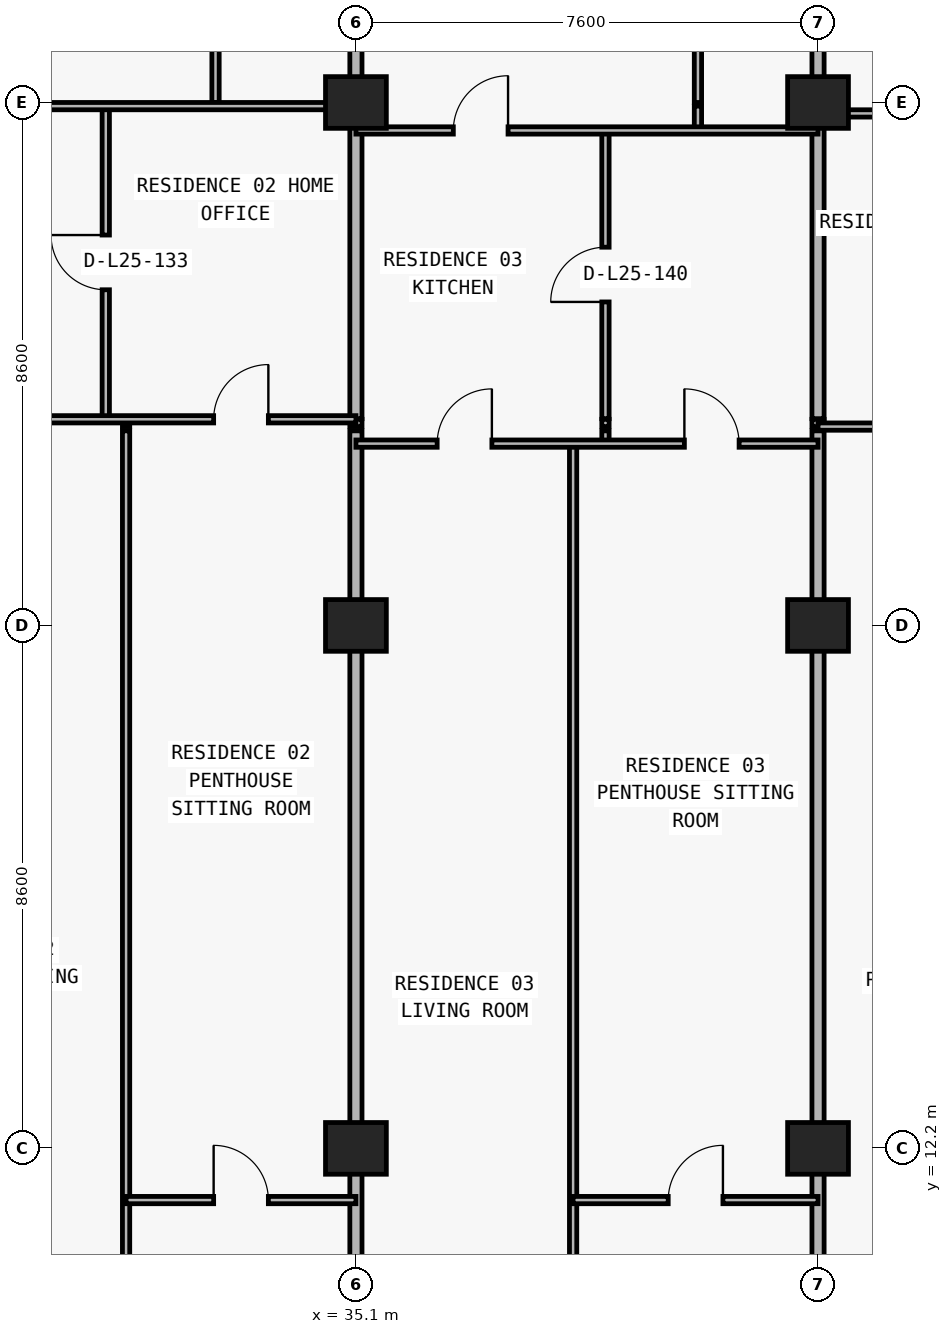
"""IFC4 building model, lengths in metres.
Left out: names, types, materials, properties, quantities, classifications, styles, units other than length and angle.
Written with IfcOpenShell. Run it as: python <this file> out.ifc"""

import sys

from ifc_helpers import new_model, si_unit, direction, frame, frame_2d, origin, origin_2d, place, context, subcontext, project, spatial, rectangle, extrude, element, fill, save


model = new_model("IFC4")
c1 = context("Model", 3, precision=1e-05, world=origin(), true_north=direction((0.0, 1.0)))
c2 = subcontext(c1, "Body", "Model", "MODEL_VIEW")
j1 = project(units=[si_unit("LENGTHUNIT", "METRE"), si_unit("PLANEANGLEUNIT", "RADIAN")], contexts=[c1])
p1 = place(None, origin())
s1 = spatial("IfcSite", under=j1, at=p1, CompositionType="ELEMENT")
p2 = place(p1, origin())
s2 = spatial("IfcBuilding", under=s1, at=p2, CompositionType="ELEMENT")
p3 = place(p2, frame((0.0, 0.0, 94.5)))
s3 = spatial("IfcBuildingStorey", under=s2, at=p3, CompositionType="ELEMENT", Elevation=94.5)
for number, where, z_axis, x_axis in (
    (1, (35.1, 12.2, 0.0), (0.0, 0.0, 1.0), (1.0, 0.0, 0.0)),
    (2, (42.7, 12.2, 0.0), (0.0, 0.0, 1.0), (1.0, 0.0, 0.0)),
    (3, (35.1, 20.8, 0.0), (0.0, 0.0, 1.0), (1.0, 0.0, 0.0)),
    (4, (42.7, 20.8, 0.0), (0.0, 0.0, 1.0), (1.0, 0.0, 0.0)),
    (5, (35.1, 29.4, 0.0), (0.0, 0.0, 1.0), (1.0, 0.0, 0.0)),
    (6, (42.7, 29.4, 0.0), (0.0, 0.0, 1.0), (1.0, 0.0, 0.0)),
):
    element("IfcColumn", number, at=place(p3, frame(where, z_axis=z_axis, x_axis=x_axis)), inside=s3, PredefinedType="COLUMN", context=c2, shape_type="SweptSolid", body=[
        extrude(rectangle(XDim=1.0, YDim=0.85, at=origin_2d()), origin(), (0.0, 0.0, 1.0), 3.0),
    ])
p4 = place(p3, frame((30.986, 24.2, 0.0), z_axis=(0.0, 0.0, 1.0), x_axis=(0.0, 1.0, 0.0)))
e7 = element("IfcWall", 7, at=p4, inside=s3, PredefinedType="PARTITIONING", context=c2, shape_type="SweptSolid", body=[
    extrude(rectangle(XDim=5.14, YDim=0.12, at=frame_2d((2.57, 0.0))), origin(), (0.0, 0.0, 1.0), 2.436),
])
p5 = place(p4, frame((2.12, 0.0, 0.0)))
e8 = element("IfcOpeningElement", 8, at=p5, cuts=e7, PredefinedType="OPENING", context=c2, shape_type="SweptSolid", body=[
    extrude(rectangle(XDim=0.9, YDim=2.15, at=frame_2d((0.45, 1.075))), frame((0.0, 0.07, 0.0), z_axis=(0.0, -1.0, 0.0), x_axis=(1.0, 0.0, 0.0)), (0.0, 0.0, 1.0), 0.14),
])
p6 = place(p3, frame((31.32, 8.84, 0.0), z_axis=(0.0, 0.0, 1.0), x_axis=(0.0, 1.0, 0.0)))
e9 = element("IfcWall", 9, at=p6, inside=s3, PredefinedType="PARTITIONING", context=c2, shape_type="SweptSolid", body=[
    extrude(rectangle(XDim=15.16, YDim=0.12, at=frame_2d((7.58, 0.0))), origin(), (0.0, 0.0, 1.0), 3.0),
])
p7 = place(p3, frame((31.32, 24.07, 0.0), z_axis=(0.0, 0.0, 1.0), x_axis=(0.0, 1.0, 0.0)))
e10 = element("IfcWall", 10, at=p7, inside=s3, PredefinedType="PARTITIONING", context=c2, shape_type="SweptSolid", body=[
    extrude(rectangle(XDim=0.12, YDim=0.12, at=frame_2d((0.06, 0.0))), origin(), (0.0, 0.0, 1.0), 3.0),
])
p8 = place(p3, frame((32.791, 29.4, 0.0), z_axis=(0.0, 0.0, 1.0), x_axis=(0.0, 1.0, 0.0)))
e11 = element("IfcWall", 11, at=p8, inside=s3, PredefinedType="PARTITIONING", context=c2, shape_type="SweptSolid", body=[
    extrude(rectangle(XDim=4.4, YDim=0.12, at=frame_2d((2.2, 0.0))), origin(), (0.0, 0.0, 1.0), 3.0),
])
p9 = place(p8, frame((1.775, 0.0, 0.0)))
e12 = element("IfcOpeningElement", 12, at=p9, cuts=e11, PredefinedType="OPENING", context=c2, shape_type="SweptSolid", body=[
    extrude(rectangle(XDim=0.85, YDim=2.1, at=frame_2d((0.425, 1.05))), frame((0.0, 0.07, 0.0), z_axis=(0.0, -1.0, 0.0), x_axis=(1.0, 0.0, 0.0)), (0.0, 0.0, 1.0), 0.14),
])
p10 = place(p3, frame((35.1, 8.84, 0.0), z_axis=(0.0, 0.0, 1.0), x_axis=(0.0, 1.0, 0.0)))
e13 = element("IfcWall", 13, at=p10, inside=s3, PredefinedType="PARTITIONING", context=c2, shape_type="SweptSolid", body=[
    extrude(rectangle(XDim=15.16, YDim=0.2, at=frame_2d((7.58, 0.0))), origin(), (0.0, 0.0, 1.0), 2.124),
])
p11 = place(p3, frame((35.1, 24.07, 0.0), z_axis=(0.0, 0.0, 1.0), x_axis=(0.0, 1.0, 0.0)))
e14 = element("IfcWall", 14, at=p11, inside=s3, PredefinedType="PARTITIONING", context=c2, shape_type="SweptSolid", body=[
    extrude(rectangle(XDim=0.12, YDim=0.2, at=frame_2d((0.06, 0.0))), origin(), (0.0, 0.0, 1.0), 2.124),
])
p12 = place(p3, frame((35.1, 24.2, 0.0), z_axis=(0.0, 0.0, 1.0), x_axis=(0.0, 1.0, 0.0)))
e15 = element("IfcWall", 15, at=p12, inside=s3, PredefinedType="PARTITIONING", context=c2, shape_type="SweptSolid", body=[
    extrude(rectangle(XDim=5.14, YDim=0.2, at=frame_2d((2.57, 0.0))), origin(), (0.0, 0.0, 1.0), 2.124),
])
p13 = place(p3, frame((35.1, 29.4, 0.0), z_axis=(0.0, 0.0, 1.0), x_axis=(0.0, 1.0, 0.0)))
e16 = element("IfcWall", 16, at=p13, inside=s3, PredefinedType="PARTITIONING", context=c2, shape_type="SweptSolid", body=[
    extrude(rectangle(XDim=4.4, YDim=0.2, at=frame_2d((2.2, 0.0))), origin(), (0.0, 0.0, 1.0), 2.124),
])
p14 = place(p3, frame((38.672, 8.84, 0.0), z_axis=(0.0, 0.0, 1.0), x_axis=(0.0, 1.0, 0.0)))
e17 = element("IfcWall", 17, at=p14, inside=s3, PredefinedType="PARTITIONING", context=c2, shape_type="SweptSolid", body=[
    extrude(rectangle(XDim=14.95, YDim=0.12, at=frame_2d((7.475, 0.0))), origin(), (0.0, 0.0, 1.0), 2.436),
])
p15 = place(p3, frame((39.204, 23.79, 0.0), z_axis=(0.0, 0.0, 1.0), x_axis=(0.0, 1.0, 0.0)))
e18 = element("IfcWall", 18, at=p15, inside=s3, PredefinedType="PARTITIONING", context=c2, shape_type="SweptSolid", body=[
    extrude(rectangle(XDim=0.21, YDim=0.12, at=frame_2d((0.105, 0.0))), origin(), (0.0, 0.0, 1.0), 3.0),
])
p16 = place(p3, frame((39.204, 24.07, 0.0), z_axis=(0.0, 0.0, 1.0), x_axis=(0.0, 1.0, 0.0)))
e19 = element("IfcWall", 19, at=p16, inside=s3, PredefinedType="PARTITIONING", context=c2, shape_type="SweptSolid", body=[
    extrude(rectangle(XDim=0.12, YDim=0.12, at=frame_2d((0.06, 0.0))), origin(), (0.0, 0.0, 1.0), 3.0),
])
p17 = place(p3, frame((39.204, 24.2, 0.0), z_axis=(0.0, 0.0, 1.0), x_axis=(0.0, 1.0, 0.0)))
e20 = element("IfcWall", 20, at=p17, inside=s3, PredefinedType="PARTITIONING", context=c2, shape_type="SweptSolid", body=[
    extrude(rectangle(XDim=4.74, YDim=0.12, at=frame_2d((2.37, 0.0))), origin(), (0.0, 0.0, 1.0), 3.0),
])
p18 = place(p17, frame((1.92, 0.0, 0.0)))
e21 = element("IfcOpeningElement", 21, at=p18, cuts=e20, PredefinedType="OPENING", context=c2, shape_type="SweptSolid", body=[
    extrude(rectangle(XDim=0.9, YDim=2.15, at=frame_2d((0.45, 1.075))), frame((0.0, 0.07, 0.0), z_axis=(0.0, -1.0, 0.0), x_axis=(1.0, 0.0, 0.0)), (0.0, 0.0, 1.0), 0.14),
])
p19 = place(p3, frame((40.725, 28.94, 0.0), z_axis=(0.0, 0.0, 1.0), x_axis=(0.0, 1.0, 0.0)))
e22 = element("IfcWall", 22, at=p19, inside=s3, PredefinedType="PARTITIONING", context=c2, shape_type="SweptSolid", body=[
    extrude(rectangle(XDim=0.4, YDim=0.12, at=frame_2d((0.2, 0.0))), origin(), (0.0, 0.0, 1.0), 2.629),
])
p20 = place(p3, frame((40.725, 29.4, 0.0), z_axis=(0.0, 0.0, 1.0), x_axis=(0.0, 1.0, 0.0)))
e23 = element("IfcWall", 23, at=p20, inside=s3, PredefinedType="PARTITIONING", context=c2, shape_type="SweptSolid", body=[
    extrude(rectangle(XDim=4.4, YDim=0.12, at=frame_2d((2.2, 0.0))), origin(), (0.0, 0.0, 1.0), 3.0),
])
p21 = place(p20, frame((1.775, 0.0, 0.0)))
e24 = element("IfcOpeningElement", 24, at=p21, cuts=e23, PredefinedType="OPENING", context=c2, shape_type="SweptSolid", body=[
    extrude(rectangle(XDim=0.85, YDim=2.1, at=frame_2d((0.425, 1.05))), frame((0.0, 0.07, 0.0), z_axis=(0.0, -1.0, 0.0), x_axis=(1.0, 0.0, 0.0)), (0.0, 0.0, 1.0), 0.14),
])
p22 = place(p3, frame((42.7, 8.84, 0.0), z_axis=(0.0, 0.0, 1.0), x_axis=(0.0, 1.0, 0.0)))
e25 = element("IfcWall", 25, at=p22, inside=s3, PredefinedType="PARTITIONING", context=c2, shape_type="SweptSolid", body=[
    extrude(rectangle(XDim=15.16, YDim=0.2, at=frame_2d((7.58, 0.0))), origin(), (0.0, 0.0, 1.0), 2.124),
])
p23 = place(p3, frame((42.7, 24.07, 0.0), z_axis=(0.0, 0.0, 1.0), x_axis=(0.0, 1.0, 0.0)))
e26 = element("IfcWall", 26, at=p23, inside=s3, PredefinedType="PARTITIONING", context=c2, shape_type="SweptSolid", body=[
    extrude(rectangle(XDim=0.12, YDim=0.2, at=frame_2d((0.06, 0.0))), origin(), (0.0, 0.0, 1.0), 2.124),
])
p24 = place(p3, frame((42.7, 24.2, 0.0), z_axis=(0.0, 0.0, 1.0), x_axis=(0.0, 1.0, 0.0)))
e27 = element("IfcWall", 27, at=p24, inside=s3, PredefinedType="PARTITIONING", context=c2, shape_type="SweptSolid", body=[
    extrude(rectangle(XDim=5.14, YDim=0.2, at=frame_2d((2.57, 0.0))), origin(), (0.0, 0.0, 1.0), 2.124),
])
p25 = place(p3, frame((42.7, 29.4, 0.0), z_axis=(0.0, 0.0, 1.0), x_axis=(0.0, 1.0, 0.0)))
e28 = element("IfcWall", 28, at=p25, inside=s3, PredefinedType="PARTITIONING", context=c2, shape_type="SweptSolid", body=[
    extrude(rectangle(XDim=4.4, YDim=0.2, at=frame_2d((2.2, 0.0))), origin(), (0.0, 0.0, 1.0), 2.124),
])
p26 = place(p3, frame((31.32, 11.35, 0.0), z_axis=(0.0, 0.0, 1.0), x_axis=(1.0, 0.0, 0.0)))
e29 = element("IfcWall", 29, at=p26, inside=s3, PredefinedType="PARTITIONING", context=c2, shape_type="SweptSolid", body=[
    extrude(rectangle(XDim=3.78, YDim=0.12, at=frame_2d((1.89, 0.0))), origin(), (0.0, 0.0, 1.0), 3.0),
])
p27 = place(p26, frame((1.44, 0.0, 0.0)))
e30 = element("IfcOpeningElement", 30, at=p27, cuts=e29, PredefinedType="OPENING", context=c2, shape_type="SweptSolid", body=[
    extrude(rectangle(XDim=0.9, YDim=2.15, at=frame_2d((0.45, 1.075))), frame((0.0, 0.07, 0.0), z_axis=(0.0, -1.0, 0.0), x_axis=(1.0, 0.0, 0.0)), (0.0, 0.0, 1.0), 0.14),
])
p28 = place(p3, frame((38.672, 11.35, 0.0), z_axis=(0.0, 0.0, 1.0), x_axis=(1.0, 0.0, 0.0)))
e31 = element("IfcWall", 31, at=p28, inside=s3, PredefinedType="PARTITIONING", context=c2, shape_type="SweptSolid", body=[
    extrude(rectangle(XDim=4.028, YDim=0.12, at=frame_2d((2.014, 0.0))), origin(), (0.0, 0.0, 1.0), 3.0),
])
p29 = place(p28, frame((1.564, 0.0, 0.0)))
e32 = element("IfcOpeningElement", 32, at=p29, cuts=e31, PredefinedType="OPENING", context=c2, shape_type="SweptSolid", body=[
    extrude(rectangle(XDim=0.9, YDim=2.15, at=frame_2d((0.45, 1.075))), frame((0.0, 0.07, 0.0), z_axis=(0.0, -1.0, 0.0), x_axis=(1.0, 0.0, 0.0)), (0.0, 0.0, 1.0), 0.14),
])
p30 = place(p3, frame((35.1, 23.79, 0.0), z_axis=(0.0, 0.0, 1.0), x_axis=(1.0, 0.0, 0.0)))
e33 = element("IfcWall", 33, at=p30, inside=s3, PredefinedType="PARTITIONING", context=c2, shape_type="SweptSolid", body=[
    extrude(rectangle(XDim=7.6, YDim=0.12, at=frame_2d((3.8, 0.0))), origin(), (0.0, 0.0, 1.0), 3.0),
])
p31 = place(p30, frame((1.336, 0.0, 0.0)))
e34 = element("IfcOpeningElement", 34, at=p31, cuts=e33, PredefinedType="OPENING", context=c2, shape_type="SweptSolid", body=[
    extrude(rectangle(XDim=0.9, YDim=2.15, at=frame_2d((0.45, 1.075))), frame((0.0, 0.07, 0.0), z_axis=(0.0, -1.0, 0.0), x_axis=(1.0, 0.0, 0.0)), (0.0, 0.0, 1.0), 0.14),
])
p32 = place(p30, frame((5.402, 0.0, 0.0)))
e35 = element("IfcOpeningElement", 35, at=p32, cuts=e33, PredefinedType="OPENING", context=c2, shape_type="SweptSolid", body=[
    extrude(rectangle(XDim=0.9, YDim=2.15, at=frame_2d((0.45, 1.075))), frame((0.0, 0.07, 0.0), z_axis=(0.0, -1.0, 0.0), x_axis=(1.0, 0.0, 0.0)), (0.0, 0.0, 1.0), 0.14),
])
p33 = place(p3, frame((42.7, 24.07, 0.0), z_axis=(0.0, 0.0, 1.0), x_axis=(1.0, 0.0, 0.0)))
e36 = element("IfcWall", 36, at=p33, inside=s3, PredefinedType="PARTITIONING", context=c2, shape_type="SweptSolid", body=[
    extrude(rectangle(XDim=8.13, YDim=0.12, at=frame_2d((4.065, 0.0))), origin(), (0.0, 0.0, 1.0), 3.0),
])
p34 = place(p33, frame((1.86, 0.0, 0.0)))
e37 = element("IfcOpeningElement", 37, at=p34, cuts=e36, PredefinedType="OPENING", context=c2, shape_type="SweptSolid", body=[
    extrude(rectangle(XDim=0.9, YDim=2.15, at=frame_2d((0.45, 1.075))), frame((0.0, 0.07, 0.0), z_axis=(0.0, -1.0, 0.0), x_axis=(1.0, 0.0, 0.0)), (0.0, 0.0, 1.0), 0.14),
])
p35 = place(p33, frame((6.008, 0.0, 0.0)))
e38 = element("IfcOpeningElement", 38, at=p35, cuts=e36, PredefinedType="OPENING", context=c2, shape_type="SweptSolid", body=[
    extrude(rectangle(XDim=0.9, YDim=2.15, at=frame_2d((0.45, 1.075))), frame((0.0, 0.07, 0.0), z_axis=(0.0, -1.0, 0.0), x_axis=(1.0, 0.0, 0.0)), (0.0, 0.0, 1.0), 0.14),
])
p36 = place(p3, frame((26.97, 24.19, 0.0), z_axis=(0.0, 0.0, 1.0), x_axis=(1.0, 0.0, 0.0)))
e39 = element("IfcWall", 39, at=p36, inside=s3, PredefinedType="PARTITIONING", context=c2, shape_type="SweptSolid", body=[
    extrude(rectangle(XDim=8.13, YDim=0.12, at=frame_2d((4.065, 0.0))), origin(), (0.0, 0.0, 1.0), 3.0),
])
p37 = place(p36, frame((1.558, 0.0, 0.0)))
e40 = element("IfcOpeningElement", 40, at=p37, cuts=e39, PredefinedType="OPENING", context=c2, shape_type="SweptSolid", body=[
    extrude(rectangle(XDim=0.9, YDim=2.15, at=frame_2d((0.45, 1.075))), frame((0.0, 0.07, 0.0), z_axis=(0.0, -1.0, 0.0), x_axis=(1.0, 0.0, 0.0)), (0.0, 0.0, 1.0), 0.14),
])
p38 = place(p36, frame((5.79, 0.0, 0.0)))
e41 = element("IfcOpeningElement", 41, at=p38, cuts=e39, PredefinedType="OPENING", context=c2, shape_type="SweptSolid", body=[
    extrude(rectangle(XDim=0.9, YDim=2.15, at=frame_2d((0.45, 1.075))), frame((0.0, 0.07, 0.0), z_axis=(0.0, -1.0, 0.0), x_axis=(1.0, 0.0, 0.0)), (0.0, 0.0, 1.0), 0.14),
])
p39 = place(p3, frame((35.1, 28.94, 0.0), z_axis=(0.0, 0.0, 1.0), x_axis=(1.0, 0.0, 0.0)))
e42 = element("IfcWall", 42, at=p39, inside=s3, PredefinedType="PARTITIONING", context=c2, shape_type="SweptSolid", body=[
    extrude(rectangle(XDim=7.6, YDim=0.12, at=frame_2d((3.8, 0.0))), origin(), (0.0, 0.0, 1.0), 3.0),
])
p40 = place(p39, frame((1.602, 0.0, 0.0)))
e43 = element("IfcOpeningElement", 43, at=p40, cuts=e42, PredefinedType="OPENING", context=c2, shape_type="SweptSolid", body=[
    extrude(rectangle(XDim=0.9, YDim=2.15, at=frame_2d((0.45, 1.075))), frame((0.0, 0.07, 0.0), z_axis=(0.0, -1.0, 0.0), x_axis=(1.0, 0.0, 0.0)), (0.0, 0.0, 1.0), 0.14),
])
p41 = place(p3, frame((42.7, 29.22, 0.0), z_axis=(0.0, 0.0, 1.0), x_axis=(1.0, 0.0, 0.0)))
e44 = element("IfcWall", 44, at=p41, inside=s3, PredefinedType="PARTITIONING", context=c2, shape_type="SweptSolid", body=[
    extrude(rectangle(XDim=8.13, YDim=0.12, at=frame_2d((4.065, 0.0))), origin(), (0.0, 0.0, 1.0), 2.124),
])
p42 = place(p41, frame((1.943, 0.0, 0.0)))
e45 = element("IfcOpeningElement", 45, at=p42, cuts=e44, PredefinedType="OPENING", context=c2, shape_type="SweptSolid", body=[
    extrude(rectangle(XDim=0.9, YDim=2.074, at=frame_2d((0.45, 1.037))), frame((0.0, 0.07, 0.0), z_axis=(0.0, -1.0, 0.0), x_axis=(1.0, 0.0, 0.0)), (0.0, 0.0, 1.0), 0.14),
])
p43 = place(p3, frame((26.97, 29.34, 0.0), z_axis=(0.0, 0.0, 1.0), x_axis=(1.0, 0.0, 0.0)))
e46 = element("IfcWall", 46, at=p43, inside=s3, PredefinedType="PARTITIONING", context=c2, shape_type="SweptSolid", body=[
    extrude(rectangle(XDim=8.13, YDim=0.12, at=frame_2d((4.065, 0.0))), origin(), (0.0, 0.0, 1.0), 2.124),
])
p44 = place(p43, frame((1.558, 0.0, 0.0)))
e47 = element("IfcOpeningElement", 47, at=p44, cuts=e46, PredefinedType="OPENING", context=c2, shape_type="SweptSolid", body=[
    extrude(rectangle(XDim=0.9, YDim=2.074, at=frame_2d((0.45, 1.037))), frame((0.0, 0.07, 0.0), z_axis=(0.0, -1.0, 0.0), x_axis=(1.0, 0.0, 0.0)), (0.0, 0.0, 1.0), 0.14),
])
p45 = place(p5, origin())
e48 = element("IfcDoor", 48, at=p45, inside=s3, OperationType="SINGLE_SWING_RIGHT", PredefinedType="DOOR", context=c2, shape_type="SweptSolid", body=[
    extrude(rectangle(XDim=0.9, YDim=2.15, at=frame_2d((0.45, 1.075))), frame((0.0, 0.025, 0.0), z_axis=(0.0, -1.0, 0.0), x_axis=(1.0, 0.0, 0.0)), (0.0, 0.0, 1.0), 0.05),
])
fill(e8, e48)
p46 = place(p38, origin())
e49 = element("IfcDoor", 49, at=p46, inside=s3, OperationType="SINGLE_SWING_RIGHT", PredefinedType="DOOR", context=c2, shape_type="SweptSolid", body=[
    extrude(rectangle(XDim=0.9, YDim=2.15, at=frame_2d((0.45, 1.075))), frame((0.0, 0.025, 0.0), z_axis=(0.0, -1.0, 0.0), x_axis=(1.0, 0.0, 0.0)), (0.0, 0.0, 1.0), 0.05),
])
fill(e41, e49)
p47 = place(p27, origin())
e50 = element("IfcDoor", 50, at=p47, inside=s3, OperationType="SINGLE_SWING_LEFT", PredefinedType="DOOR", context=c2, shape_type="SweptSolid", body=[
    extrude(rectangle(XDim=0.9, YDim=2.15, at=frame_2d((0.45, 1.075))), frame((0.0, 0.025, 0.0), z_axis=(0.0, -1.0, 0.0), x_axis=(1.0, 0.0, 0.0)), (0.0, 0.0, 1.0), 0.05),
])
fill(e30, e50)
p48 = place(p40, origin())
e51 = element("IfcDoor", 51, at=p48, inside=s3, OperationType="SINGLE_SWING_RIGHT", PredefinedType="DOOR", context=c2, shape_type="SweptSolid", body=[
    extrude(rectangle(XDim=0.9, YDim=2.15, at=frame_2d((0.45, 1.075))), frame((0.0, 0.025, 0.0), z_axis=(0.0, -1.0, 0.0), x_axis=(1.0, 0.0, 0.0)), (0.0, 0.0, 1.0), 0.05),
])
fill(e43, e51)
p49 = place(p18, origin())
e52 = element("IfcDoor", 52, at=p49, inside=s3, OperationType="SINGLE_SWING_LEFT", PredefinedType="DOOR", context=c2, shape_type="SweptSolid", body=[
    extrude(rectangle(XDim=0.9, YDim=2.15, at=frame_2d((0.45, 1.075))), frame((0.0, 0.025, 0.0), z_axis=(0.0, -1.0, 0.0), x_axis=(1.0, 0.0, 0.0)), (0.0, 0.0, 1.0), 0.05),
])
fill(e21, e52)
p50 = place(p31, origin())
e53 = element("IfcDoor", 53, at=p50, inside=s3, OperationType="SINGLE_SWING_RIGHT", PredefinedType="DOOR", context=c2, shape_type="SweptSolid", body=[
    extrude(rectangle(XDim=0.9, YDim=2.15, at=frame_2d((0.45, 1.075))), frame((0.0, 0.025, 0.0), z_axis=(0.0, -1.0, 0.0), x_axis=(1.0, 0.0, 0.0)), (0.0, 0.0, 1.0), 0.05),
])
fill(e34, e53)
p51 = place(p32, origin())
e54 = element("IfcDoor", 54, at=p51, inside=s3, OperationType="SINGLE_SWING_LEFT", PredefinedType="DOOR", context=c2, shape_type="SweptSolid", body=[
    extrude(rectangle(XDim=0.9, YDim=2.15, at=frame_2d((0.45, 1.075))), frame((0.0, 0.025, 0.0), z_axis=(0.0, -1.0, 0.0), x_axis=(1.0, 0.0, 0.0)), (0.0, 0.0, 1.0), 0.05),
])
fill(e35, e54)
p52 = place(p29, origin())
e55 = element("IfcDoor", 55, at=p52, inside=s3, OperationType="SINGLE_SWING_RIGHT", PredefinedType="DOOR", context=c2, shape_type="SweptSolid", body=[
    extrude(rectangle(XDim=0.9, YDim=2.15, at=frame_2d((0.45, 1.075))), frame((0.0, 0.025, 0.0), z_axis=(0.0, -1.0, 0.0), x_axis=(1.0, 0.0, 0.0)), (0.0, 0.0, 1.0), 0.05),
])
fill(e32, e55)
save(model, sys.argv[1])
